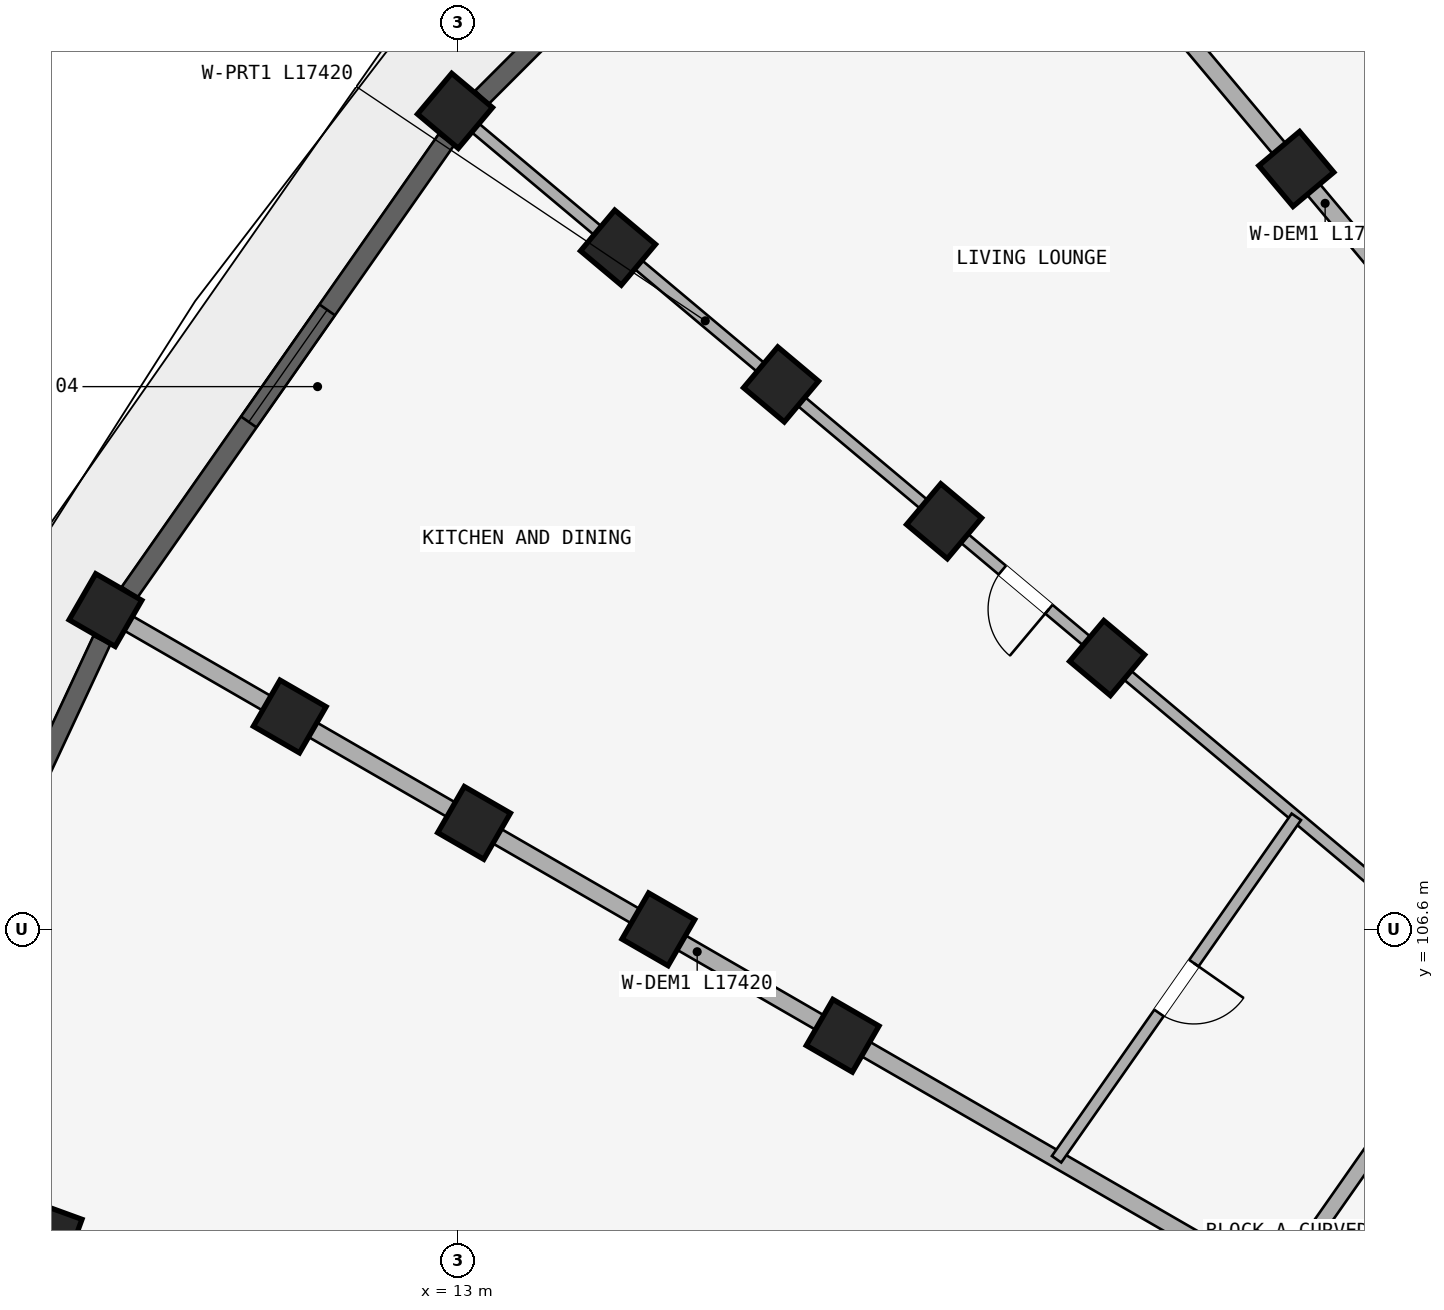
"""IFC4 building model, lengths in metres.
Left out: names, types, materials, properties, quantities, classifications, styles, units other than length and angle.
Written with IfcOpenShell. Run it as: python <this file> out.ifc"""

import sys

from ifc_helpers import new_model, si_unit, direction, frame, frame_2d, origin, origin_2d, place, context, subcontext, project, spatial, rectangle, extrude, element, fill, save


model = new_model("IFC4")
c1 = context("Model", 3, precision=1e-05, world=origin(), true_north=direction((0.0, 1.0)))
c2 = subcontext(c1, "Body", "Model", "MODEL_VIEW")
j1 = project(units=[si_unit("LENGTHUNIT", "METRE"), si_unit("PLANEANGLEUNIT", "RADIAN")], contexts=[c1])
p1 = place(None, origin())
s1 = spatial("IfcSite", under=j1, at=p1, CompositionType="ELEMENT")
p2 = place(p1, origin())
s2 = spatial("IfcBuilding", under=s1, at=p2, CompositionType="ELEMENT")
p3 = place(p2, frame((0.0, 0.0, 24.45)))
s3 = spatial("IfcBuildingStorey", under=s2, at=p3, CompositionType="ELEMENT", Elevation=24.45)
for number, where, z_axis, x_axis in (
    (1, (24.031, 116.603, 0.0), (0.0, 0.0, 1.0), (0.766, 0.643, 0.0)),
    (2, (21.542, 110.169, 0.0), (0.0, 0.0, 1.0), (0.643, 0.766, 0.0)),
    (3, (19.397, 111.969, 0.0), (0.0, 0.0, 1.0), (0.643, 0.766, 0.0)),
    (4, (17.252, 113.769, 0.0), (0.0, 0.0, 1.0), (0.643, 0.766, 0.0)),
    (5, (15.107, 115.568, 0.0), (0.0, 0.0, 1.0), (0.643, 0.766, 0.0)),
    (6, (12.962, 117.368, 0.0), (0.0, 0.0, 1.0), (0.643, 0.766, 0.0)),
    (7, (18.062, 105.2, 0.0), (0.0, 0.0, 1.0), (0.5, 0.866, 0.0)),
    (8, (15.637, 106.6, 0.0), (0.0, 0.0, 1.0), (0.5, 0.866, 0.0)),
    (9, (13.213, 108.0, 0.0), (0.0, 0.0, 1.0), (0.5, 0.866, 0.0)),
    (10, (10.788, 109.4, 0.0), (0.0, 0.0, 1.0), (0.5, 0.866, 0.0)),
    (11, (8.363, 110.8, 0.0), (0.0, 0.0, 1.0), (0.5, 0.866, 0.0)),
    (12, (7.605, 102.575, 0.0), (0.0, 0.0, 1.0), (0.342, 0.94, 0.0)),
):
    element("IfcColumn", number, at=place(p3, frame(where, z_axis=z_axis, x_axis=x_axis)), inside=s3, PredefinedType="COLUMN", context=c2, shape_type="SweptSolid", body=[
        extrude(rectangle(XDim=0.7, YDim=0.7, at=origin_2d()), origin(), (0.0, 0.0, 1.0), 2.93),
    ])
p4 = place(p3, frame((26.598, 105.927, 0.0), z_axis=(0.0, 0.0, 1.0), x_axis=(-0.573592335331, -0.819140911474, 0.0)))
e13 = element("IfcWall", 13, at=p4, inside=s3, PredefinedType="STANDARD", context=c2, shape_type="SweptSolid", body=[
    extrude(rectangle(XDim=4.916, YDim=0.2, at=frame_2d((2.458, 0.0))), origin(), (0.0, 0.0, 1.0), 2.372),
])
p5 = place(p3, frame((30.009, 109.479, 0.0), z_axis=(0.0, 0.0, 1.0), x_axis=(-0.642784757967, 0.766046835987, 0.0)))
e14 = element("IfcWall", 14, at=p5, inside=s3, PredefinedType="STANDARD", context=c2, shape_type="SweptSolid", body=[
    extrude(rectangle(XDim=17.42, YDim=0.22, at=frame_2d((8.71, 0.0))), origin(), (0.0, 0.0, 1.0), 2.372),
])
p6 = place(p3, frame((26.521, 105.991, 0.0), z_axis=(0.0, 0.0, 1.0), x_axis=(-0.766046835987, 0.642784757967, 0.0)))
e15 = element("IfcWall", 15, at=p6, inside=s3, PredefinedType="PARTITIONING", context=c2, shape_type="SweptSolid", body=[
    extrude(rectangle(XDim=17.42, YDim=0.15, at=frame_2d((8.71, 0.0))), origin(), (0.0, 0.0, 1.0), 2.372),
])
p7 = place(p6, frame((7.5, 0.0, 0.0)))
e16 = element("IfcOpeningElement", 16, at=p7, cuts=e15, PredefinedType="OPENING", context=c2, shape_type="SweptSolid", body=[
    extrude(rectangle(XDim=0.8, YDim=2.1, at=frame_2d((0.4, 1.05))), frame((0.0, 0.085, 0.0), z_axis=(0.0, -1.0, 0.0), x_axis=(1.0, 0.0, 0.0)), (0.0, 0.0, 1.0), 0.17),
])
p8 = place(p3, frame((23.691, 101.95, 0.0), z_axis=(0.0, 0.0, 1.0), x_axis=(-0.866026648973, 0.499997843263, 0.0)))
e17 = element("IfcWall", 17, at=p8, inside=s3, PredefinedType="STANDARD", context=c2, shape_type="SweptSolid", body=[
    extrude(rectangle(XDim=17.42, YDim=0.22, at=frame_2d((8.71, 0.0))), origin(), (0.0, 0.0, 1.0), 2.372),
])
p9 = place(p3, frame((21.607, 97.479, 0.0), z_axis=(0.0, 0.0, 1.0), x_axis=(-0.939691901159, 0.342022120477, 0.0)))
e18 = element("IfcWall", 18, at=p9, inside=s3, PredefinedType="PARTITIONING", context=c2, shape_type="SweptSolid", body=[
    extrude(rectangle(XDim=17.42, YDim=0.15, at=frame_2d((8.71, 0.0))), origin(), (0.0, 0.0, 1.0), 2.372),
])
p10 = place(p9, frame((7.5, 0.0, 0.0)))
e19 = element("IfcOpeningElement", 19, at=p10, cuts=e18, PredefinedType="OPENING", context=c2, shape_type="SweptSolid", body=[
    extrude(rectangle(XDim=0.8, YDim=2.1, at=frame_2d((0.4, 1.05))), frame((0.0, 0.085, 0.0), z_axis=(0.0, -1.0, 0.0), x_axis=(1.0, 0.0, 0.0)), (0.0, 0.0, 1.0), 0.17),
])
p11 = place(p3, frame((24.031, 108.08, 0.0), z_axis=(0.0, 0.0, 1.0), x_axis=(-0.573569599955, -0.819156831143, 0.0)))
e20 = element("IfcWall", 20, at=p11, inside=s3, PredefinedType="PLUMBINGWALL", context=c2, shape_type="SweptSolid", body=[
    extrude(rectangle(XDim=5.5, YDim=0.15, at=frame_2d((2.75, 0.0))), origin(), (0.0, 0.0, 1.0), 2.372),
])
p12 = place(p11, frame((2.35, 0.0, 0.0)))
e21 = element("IfcOpeningElement", 21, at=p12, cuts=e20, PredefinedType="OPENING", context=c2, shape_type="SweptSolid", body=[
    extrude(rectangle(XDim=0.8, YDim=2.1, at=frame_2d((0.4, 1.05))), frame((0.0, 0.085, 0.0), z_axis=(0.0, -1.0, 0.0), x_axis=(1.0, 0.0, 0.0)), (0.0, 0.0, 1.0), 0.17),
])
p13 = place(p3, frame((18.454, 122.684, 0.0), z_axis=(0.0, 0.0, 1.0), x_axis=(-0.707106781187, -0.707106781187, 0.0)))
e22 = element("IfcWall", 22, at=p13, inside=s3, PredefinedType="STANDARD", context=c2, shape_type="SweptSolid", body=[
    extrude(rectangle(XDim=7.267, YDim=0.25, at=frame_2d((3.633, 0.0))), origin(), (0.0, 0.0, 1.0), 2.372),
])
p14 = place(p13, frame((4.766, 0.0, 0.322)))
e23 = element("IfcOpeningElement", 23, at=p14, cuts=e22, PredefinedType="OPENING", context=c2, shape_type="SweptSolid", body=[
    extrude(rectangle(XDim=1.2, YDim=1.5, at=frame_2d((0.6, 0.75))), frame((0.0, 0.135, 0.0), z_axis=(0.0, -1.0, 0.0), x_axis=(1.0, 0.0, 0.0)), (0.0, 0.0, 1.0), 0.27),
])
p15 = place(p13, frame((1.883, 0.0, 0.0)))
e24 = element("IfcOpeningElement", 24, at=p15, cuts=e22, PredefinedType="OPENING", context=c2, shape_type="SweptSolid", body=[
    extrude(rectangle(XDim=1.32, YDim=2.15, at=frame_2d((0.66, 1.075))), frame((0.0, 0.135, 0.0), z_axis=(0.0, -1.0, 0.0), x_axis=(1.0, 0.0, 0.0)), (0.0, 0.0, 1.0), 0.27),
])
p16 = place(p3, frame((12.849, 116.989, 0.0), z_axis=(0.0, 0.0, 1.0), x_axis=(-0.573566061701, -0.819159308599, 0.0)))
e25 = element("IfcWall", 25, at=p16, inside=s3, PredefinedType="STANDARD", context=c2, shape_type="SweptSolid", body=[
    extrude(rectangle(XDim=7.267, YDim=0.25, at=frame_2d((3.633, 0.0))), origin(), (0.0, 0.0, 1.0), 2.372),
])
p17 = place(p16, frame((2.733, 0.0, 0.522)))
e26 = element("IfcOpeningElement", 26, at=p17, cuts=e25, PredefinedType="OPENING", context=c2, shape_type="SweptSolid", body=[
    extrude(rectangle(XDim=1.8, YDim=1.65, at=frame_2d((0.9, 0.825))), frame((0.0, 0.135, 0.0), z_axis=(0.0, -1.0, 0.0), x_axis=(1.0, 0.0, 0.0)), (0.0, 0.0, 1.0), 0.27),
])
p18 = place(p3, frame((8.317, 110.406, 0.0), z_axis=(0.0, 0.0, 1.0), x_axis=(-0.422627946127, -0.90630327107, 0.0)))
e27 = element("IfcWall", 27, at=p18, inside=s3, PredefinedType="STANDARD", context=c2, shape_type="SweptSolid", body=[
    extrude(rectangle(XDim=7.267, YDim=0.25, at=frame_2d((3.633, 0.0))), origin(), (0.0, 0.0, 1.0), 2.372),
])
p19 = place(p18, frame((2.808, 0.0, 0.422)))
e28 = element("IfcOpeningElement", 28, at=p19, cuts=e27, PredefinedType="OPENING", context=c2, shape_type="SweptSolid", body=[
    extrude(rectangle(XDim=1.65, YDim=1.75, at=frame_2d((0.825, 0.875))), frame((0.0, 0.135, 0.0), z_axis=(0.0, -1.0, 0.0), x_axis=(1.0, 0.0, 0.0)), (0.0, 0.0, 1.0), 0.27),
])
p20 = place(p17, origin())
e29 = element("IfcWindow", 29, at=p20, inside=s3, PartitioningType="DOUBLE_PANEL_VERTICAL", PredefinedType="WINDOW", context=c2, shape_type="SweptSolid", body=[
    extrude(rectangle(XDim=1.8, YDim=1.65, at=frame_2d((0.9, 0.825))), frame((0.0, 0.03, 0.0), z_axis=(0.0, -1.0, 0.0), x_axis=(1.0, 0.0, 0.0)), (0.0, 0.0, 1.0), 0.06),
])
fill(e26, e29)
p21 = place(p7, origin())
e30 = element("IfcDoor", 30, at=p21, inside=s3, OperationType="SINGLE_SWING_LEFT", PredefinedType="DOOR", context=c2, shape_type="SweptSolid", body=[
    extrude(rectangle(XDim=0.8, YDim=2.1, at=frame_2d((0.4, 1.05))), frame((0.0, 0.025, 0.0), z_axis=(0.0, -1.0, 0.0), x_axis=(1.0, 0.0, 0.0)), (0.0, 0.0, 1.0), 0.05),
])
fill(e16, e30)
p22 = place(p12, origin())
e31 = element("IfcDoor", 31, at=p22, inside=s3, OperationType="SINGLE_SWING_LEFT", PredefinedType="DOOR", context=c2, shape_type="SweptSolid", body=[
    extrude(rectangle(XDim=0.8, YDim=2.1, at=frame_2d((0.4, 1.05))), frame((0.0, 0.025, 0.0), z_axis=(0.0, -1.0, 0.0), x_axis=(1.0, 0.0, 0.0)), (0.0, 0.0, 1.0), 0.05),
])
fill(e21, e31)
save(model, sys.argv[1])
